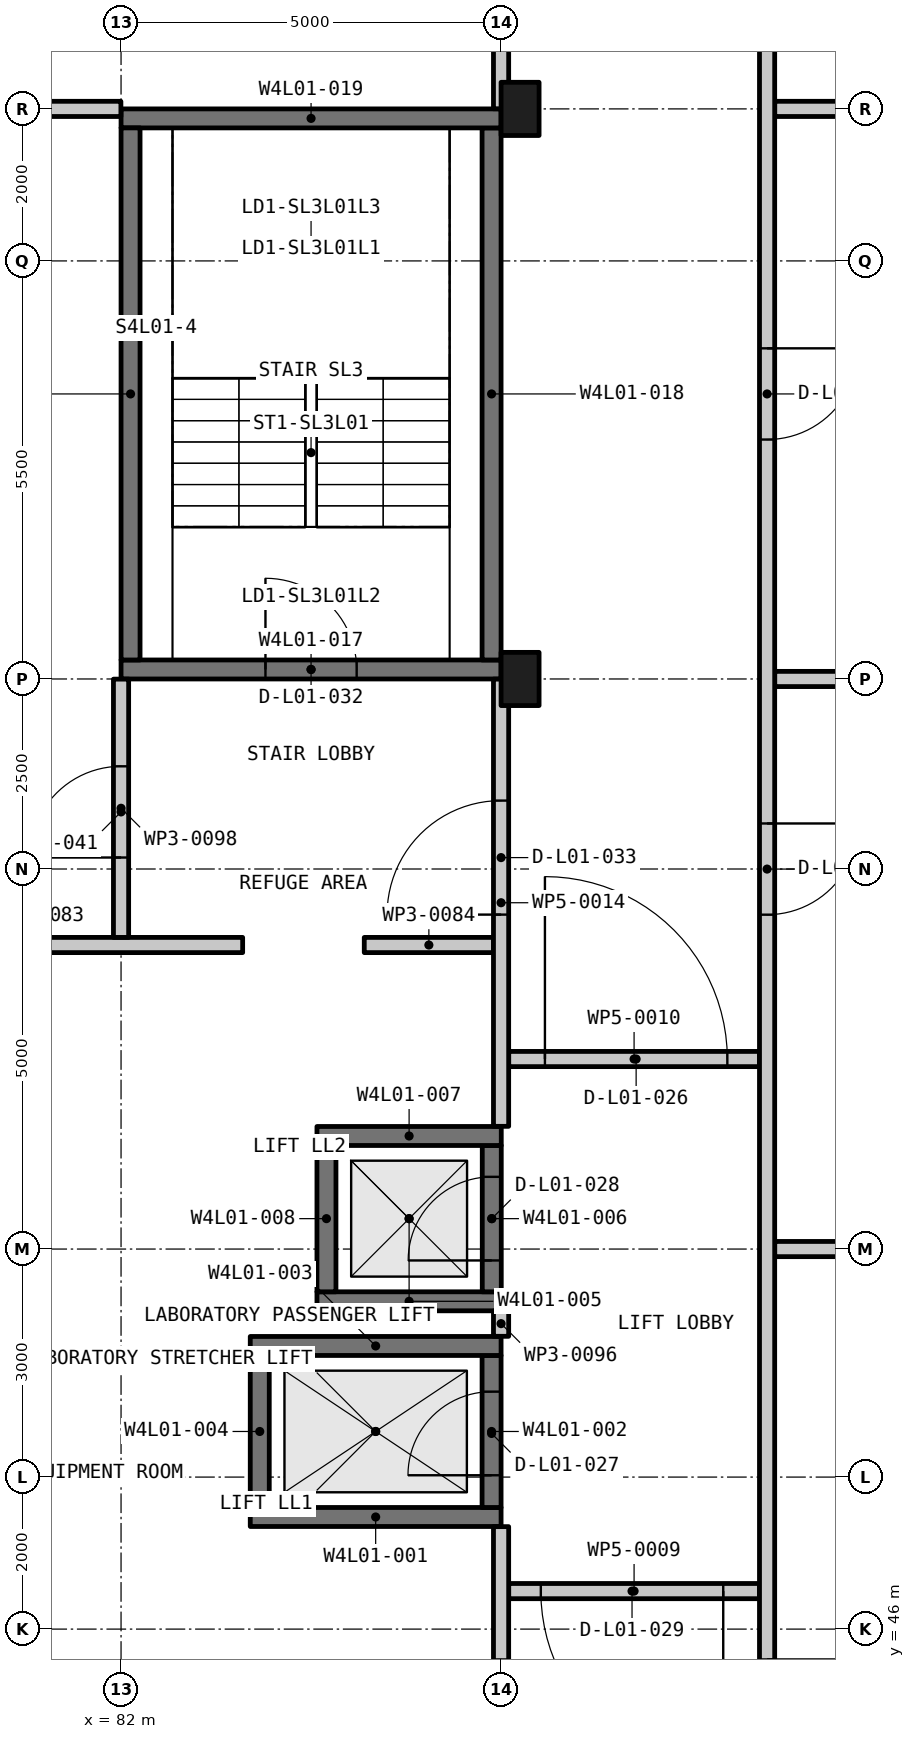
"""IFC4 building model, lengths in metres.
Left out: names, types, materials, properties, quantities, classifications, styles, units other than length and angle.
Written with IfcOpenShell. Run it as: python <this file> out.ifc"""

import sys

from ifc_helpers import new_model, si_unit, direction, frame, frame_2d, origin, origin_2d, place, context, subcontext, project, spatial, rectangle, extrude, element, fill, save


model = new_model("IFC4")
c1 = context("Model", 3, precision=1e-05, world=origin(), true_north=direction((0.0, 1.0)))
c2 = subcontext(c1, "Body", "Model", "MODEL_VIEW")
j1 = project(units=[si_unit("LENGTHUNIT", "METRE"), si_unit("PLANEANGLEUNIT", "RADIAN")], contexts=[c1])
p1 = place(None, origin())
s1 = spatial("IfcSite", under=j1, at=p1, CompositionType="ELEMENT")
p2 = place(p1, origin())
s2 = spatial("IfcBuilding", under=s1, at=p2, CompositionType="ELEMENT")
p3 = place(p2, frame((0.0, 0.0, 6.0)))
s3 = spatial("IfcBuildingStorey", under=s2, at=p3, CompositionType="ELEMENT", Elevation=6.0)
for number, where, z_axis, x_axis in (
    (1, (87.25, 58.5, -0.3), (0.0, 0.0, 1.0), (1.0, 0.0, 0.0)),
    (2, (87.25, 66.0, -0.3), (0.0, 0.0, 1.0), (1.0, 0.0, 0.0)),
):
    element("IfcColumn", number, at=place(p3, frame(where, z_axis=z_axis, x_axis=x_axis)), inside=s3, PredefinedType="COLUMN", context=c2, shape_type="SweptSolid", body=[
        extrude(rectangle(XDim=0.5, YDim=0.7, at=origin_2d()), origin(), (0.0, 0.0, 1.0), 5.25),
    ])
p4 = place(p3, frame((83.7, 47.475, -0.3), z_axis=(0.0, 0.0, 1.0), x_axis=(1.0, 0.0, 0.0)))
e3 = element("IfcWall", 3, at=p4, inside=s3, PredefinedType="SHEAR", context=c2, shape_type="SweptSolid", body=[
    extrude(rectangle(XDim=3.3, YDim=0.25, at=frame_2d((1.65, 0.0))), origin(), (0.0, 0.0, 1.0), 5.25),
])
p5 = place(p3, frame((86.875, 47.6, -0.3), z_axis=(0.0, 0.0, 1.0), x_axis=(0.0, 1.0, 0.0)))
e4 = element("IfcWall", 4, at=p5, inside=s3, PredefinedType="SHEAR", context=c2, shape_type="SweptSolid", body=[
    extrude(rectangle(XDim=2.0, YDim=0.25, at=frame_2d((1.0, 0.0))), origin(), (0.0, 0.0, 1.0), 5.25),
])
p6 = place(p5, frame((0.424, 0.0, 0.3)))
e5 = element("IfcOpeningElement", 5, at=p6, cuts=e4, PredefinedType="OPENING", context=c2, shape_type="SweptSolid", body=[
    extrude(rectangle(XDim=1.1, YDim=2.1, at=frame_2d((0.55, 1.05))), frame((0.0, 0.135, 0.0), z_axis=(0.0, -1.0, 0.0), x_axis=(1.0, 0.0, 0.0)), (0.0, 0.0, 1.0), 0.27),
])
p7 = place(p3, frame((83.7, 49.725, -0.3), z_axis=(0.0, 0.0, 1.0), x_axis=(1.0, 0.0, 0.0)))
e6 = element("IfcWall", 6, at=p7, inside=s3, PredefinedType="SHEAR", context=c2, shape_type="SweptSolid", body=[
    extrude(rectangle(XDim=3.3, YDim=0.25, at=frame_2d((1.65, 0.0))), origin(), (0.0, 0.0, 1.0), 5.25),
])
p8 = place(p3, frame((83.825, 47.6, -0.3), z_axis=(0.0, 0.0, 1.0), x_axis=(0.0, 1.0, 0.0)))
e7 = element("IfcWall", 7, at=p8, inside=s3, PredefinedType="SHEAR", context=c2, shape_type="SweptSolid", body=[
    extrude(rectangle(XDim=2.0, YDim=0.25, at=frame_2d((1.0, 0.0))), origin(), (0.0, 0.0, 1.0), 5.25),
])
p9 = place(p3, frame((84.577, 50.312, -0.3), z_axis=(0.0, 0.0, 1.0), x_axis=(1.0, 0.0, 0.0)))
e8 = element("IfcWall", 8, at=p9, inside=s3, PredefinedType="SHEAR", context=c2, shape_type="SweptSolid", body=[
    extrude(rectangle(XDim=2.425, YDim=0.25, at=frame_2d((1.212, 0.0))), origin(), (0.0, 0.0, 1.0), 5.25),
])
p10 = place(p3, frame((86.877, 50.438, -0.3), z_axis=(0.0, 0.0, 1.0), x_axis=(0.0, 1.0, 0.0)))
e9 = element("IfcWall", 9, at=p10, inside=s3, PredefinedType="SHEAR", context=c2, shape_type="SweptSolid", body=[
    extrude(rectangle(XDim=1.925, YDim=0.25, at=frame_2d((0.962, 0.0))), origin(), (0.0, 0.0, 1.0), 5.25),
])
p11 = place(p10, frame((0.413, 0.0, 0.3)))
e10 = element("IfcOpeningElement", 10, at=p11, cuts=e9, PredefinedType="OPENING", context=c2, shape_type="SweptSolid", body=[
    extrude(rectangle(XDim=1.1, YDim=2.1, at=frame_2d((0.55, 1.05))), frame((0.0, 0.135, 0.0), z_axis=(0.0, -1.0, 0.0), x_axis=(1.0, 0.0, 0.0)), (0.0, 0.0, 1.0), 0.27),
])
p12 = place(p3, frame((84.577, 52.488, -0.3), z_axis=(0.0, 0.0, 1.0), x_axis=(1.0, 0.0, 0.0)))
e11 = element("IfcWall", 11, at=p12, inside=s3, PredefinedType="SHEAR", context=c2, shape_type="SweptSolid", body=[
    extrude(rectangle(XDim=2.425, YDim=0.25, at=frame_2d((1.212, 0.0))), origin(), (0.0, 0.0, 1.0), 5.25),
])
p13 = place(p3, frame((84.702, 50.438, -0.3), z_axis=(0.0, 0.0, 1.0), x_axis=(0.0, 1.0, 0.0)))
e12 = element("IfcWall", 12, at=p13, inside=s3, PredefinedType="SHEAR", context=c2, shape_type="SweptSolid", body=[
    extrude(rectangle(XDim=1.925, YDim=0.25, at=frame_2d((0.962, 0.0))), origin(), (0.0, 0.0, 1.0), 5.25),
])
p14 = place(p3, frame((82.0, 58.625, -0.3), z_axis=(0.0, 0.0, 1.0), x_axis=(1.0, 0.0, 0.0)))
e13 = element("IfcWall", 13, at=p14, inside=s3, PredefinedType="SHEAR", context=c2, shape_type="SweptSolid", body=[
    extrude(rectangle(XDim=5.0, YDim=0.25, at=frame_2d((2.5, 0.0))), origin(), (0.0, 0.0, 1.0), 5.25),
])
p15 = place(p14, frame((1.9, 0.0, 0.3)))
e14 = element("IfcOpeningElement", 14, at=p15, cuts=e13, PredefinedType="OPENING", context=c2, shape_type="SweptSolid", body=[
    extrude(rectangle(XDim=1.2, YDim=2.2, at=frame_2d((0.6, 1.1))), frame((0.0, 0.135, 0.0), z_axis=(0.0, -1.0, 0.0), x_axis=(1.0, 0.0, 0.0)), (0.0, 0.0, 1.0), 0.27),
])
p16 = place(p3, frame((86.875, 58.75, -0.3), z_axis=(0.0, 0.0, 1.0), x_axis=(0.0, 1.0, 0.0)))
e15 = element("IfcWall", 15, at=p16, inside=s3, PredefinedType="SHEAR", context=c2, shape_type="SweptSolid", body=[
    extrude(rectangle(XDim=7.0, YDim=0.25, at=frame_2d((3.5, 0.0))), origin(), (0.0, 0.0, 1.0), 5.25),
])
p17 = place(p3, frame((82.0, 65.875, -0.3), z_axis=(0.0, 0.0, 1.0), x_axis=(1.0, 0.0, 0.0)))
e16 = element("IfcWall", 16, at=p17, inside=s3, PredefinedType="SHEAR", context=c2, shape_type="SweptSolid", body=[
    extrude(rectangle(XDim=5.0, YDim=0.25, at=frame_2d((2.5, 0.0))), origin(), (0.0, 0.0, 1.0), 5.25),
])
p18 = place(p3, frame((82.125, 58.75, -0.3), z_axis=(0.0, 0.0, 1.0), x_axis=(0.0, 1.0, 0.0)))
e17 = element("IfcWall", 17, at=p18, inside=s3, PredefinedType="SHEAR", context=c2, shape_type="SweptSolid", body=[
    extrude(rectangle(XDim=7.0, YDim=0.25, at=frame_2d((3.5, 0.0))), origin(), (0.0, 0.0, 1.0), 5.25),
])
p19 = place(p3, frame((90.4, 46.5, 0.0), z_axis=(0.0, 0.0, 1.0), x_axis=(-1.0, 0.0, 0.0)))
e18 = element("IfcWall", 18, at=p19, inside=s3, PredefinedType="PARTITIONING", context=c2, shape_type="SweptSolid", body=[
    extrude(rectangle(XDim=3.3, YDim=0.2, at=frame_2d((1.65, 0.0))), origin(), (0.0, 0.0, 1.0), 4.15),
])
p20 = place(p19, frame((0.477, 0.0, 0.0)))
e19 = element("IfcOpeningElement", 19, at=p20, cuts=e18, PredefinedType="OPENING", context=c2, shape_type="SweptSolid", body=[
    extrude(rectangle(XDim=2.4, YDim=2.1, at=frame_2d((1.2, 1.05))), frame((0.0, 0.11, 0.0), z_axis=(0.0, -1.0, 0.0), x_axis=(1.0, 0.0, 0.0)), (0.0, 0.0, 1.0), 0.22),
])
p21 = place(p3, frame((90.6, 51.0, 0.0), z_axis=(0.0, 0.0, 1.0), x_axis=(1.0, 0.0, 0.0)))
e20 = element("IfcWall", 20, at=p21, inside=s3, PredefinedType="PARTITIONING", context=c2, shape_type="SweptSolid", body=[
    extrude(rectangle(XDim=13.2, YDim=0.2, at=frame_2d((6.6, 0.0))), origin(), (0.0, 0.0, 1.0), 4.05),
])
p22 = place(p3, frame((87.1, 53.5, 0.0), z_axis=(0.0, 0.0, 1.0), x_axis=(1.0, 0.0, 0.0)))
e21 = element("IfcWall", 21, at=p22, inside=s3, PredefinedType="PARTITIONING", context=c2, shape_type="SweptSolid", body=[
    extrude(rectangle(XDim=3.3, YDim=0.2, at=frame_2d((1.65, 0.0))), origin(), (0.0, 0.0, 1.0), 4.15),
])
p23 = place(p22, frame((0.477, 0.0, 0.0)))
e22 = element("IfcOpeningElement", 22, at=p23, cuts=e21, PredefinedType="OPENING", context=c2, shape_type="SweptSolid", body=[
    extrude(rectangle(XDim=2.4, YDim=2.1, at=frame_2d((1.2, 1.05))), frame((0.0, 0.11, 0.0), z_axis=(0.0, -1.0, 0.0), x_axis=(1.0, 0.0, 0.0)), (0.0, 0.0, 1.0), 0.22),
])
p24 = place(p3, frame((78.2, 55.0, 0.0), z_axis=(0.0, 0.0, 1.0), x_axis=(1.0, 0.0, 0.0)))
e23 = element("IfcWall", 23, at=p24, inside=s3, PredefinedType="PARTITIONING", context=c2, shape_type="SweptSolid", body=[
    extrude(rectangle(XDim=5.4, YDim=0.2, at=frame_2d((2.7, 0.0))), origin(), (0.0, 0.0, 1.0), 4.15),
])
p25 = place(p3, frame((85.2, 55.0, 0.0), z_axis=(0.0, 0.0, 1.0), x_axis=(1.0, 0.0, 0.0)))
e24 = element("IfcWall", 24, at=p25, inside=s3, PredefinedType="PARTITIONING", context=c2, shape_type="SweptSolid", body=[
    extrude(rectangle(XDim=1.7, YDim=0.2, at=frame_2d((0.85, 0.0))), origin(), (0.0, 0.0, 1.0), 4.35),
])
p26 = place(p3, frame((90.6, 58.5, 0.0), z_axis=(0.0, 0.0, 1.0), x_axis=(1.0, 0.0, 0.0)))
e25 = element("IfcWall", 25, at=p26, inside=s3, PredefinedType="PARTITIONING", context=c2, shape_type="SweptSolid", body=[
    extrude(rectangle(XDim=13.2, YDim=0.2, at=frame_2d((6.6, 0.0))), origin(), (0.0, 0.0, 1.0), 4.05),
])
p27 = place(p3, frame((78.2, 66.0, 0.0), z_axis=(0.0, 0.0, 1.0), x_axis=(1.0, 0.0, 0.0)))
e26 = element("IfcWall", 26, at=p27, inside=s3, PredefinedType="PARTITIONING", context=c2, shape_type="SweptSolid", body=[
    extrude(rectangle(XDim=3.798, YDim=0.2, at=frame_2d((1.899, 0.0))), origin(), (0.0, 0.0, 1.0), 4.15),
])
p28 = place(p3, frame((90.6, 66.0, 0.0), z_axis=(0.0, 0.0, 1.0), x_axis=(1.0, 0.0, 0.0)))
e27 = element("IfcWall", 27, at=p28, inside=s3, PredefinedType="PARTITIONING", context=c2, shape_type="SweptSolid", body=[
    extrude(rectangle(XDim=13.2, YDim=0.2, at=frame_2d((6.6, 0.0))), origin(), (0.0, 0.0, 1.0), 4.05),
])
p29 = place(p3, frame((90.5, 80.8, 0.0), z_axis=(0.0, 0.0, 1.0), x_axis=(0.0, -1.0, 0.0)))
e28 = element("IfcWall", 28, at=p29, inside=s3, PredefinedType="PARTITIONING", context=c2, shape_type="SweptSolid", body=[
    extrude(rectangle(XDim=74.6, YDim=0.2, at=frame_2d((37.3, 0.0))), origin(), (0.0, 0.0, 1.0), 4.05),
])
p30 = place(p29, frame((70.35, 0.0, 0.0)))
e29 = element("IfcOpeningElement", 29, at=p30, cuts=e28, PredefinedType="OPENING", context=c2, shape_type="SweptSolid", body=[
    extrude(rectangle(XDim=1.2, YDim=2.1, at=frame_2d((0.6, 1.05))), frame((0.0, 0.11, 0.0), z_axis=(0.0, -1.0, 0.0), x_axis=(1.0, 0.0, 0.0)), (0.0, 0.0, 1.0), 0.22),
])
p31 = place(p29, frame((62.95, 0.0, 0.0)))
e30 = element("IfcOpeningElement", 30, at=p31, cuts=e28, PredefinedType="OPENING", context=c2, shape_type="SweptSolid", body=[
    extrude(rectangle(XDim=1.2, YDim=2.1, at=frame_2d((0.6, 1.05))), frame((0.0, 0.11, 0.0), z_axis=(0.0, -1.0, 0.0), x_axis=(1.0, 0.0, 0.0)), (0.0, 0.0, 1.0), 0.22),
])
p32 = place(p29, frame((55.45, 0.0, 0.0)))
e31 = element("IfcOpeningElement", 31, at=p32, cuts=e28, PredefinedType="OPENING", context=c2, shape_type="SweptSolid", body=[
    extrude(rectangle(XDim=1.2, YDim=2.1, at=frame_2d((0.6, 1.05))), frame((0.0, 0.11, 0.0), z_axis=(0.0, -1.0, 0.0), x_axis=(1.0, 0.0, 0.0)), (0.0, 0.0, 1.0), 0.22),
])
p33 = place(p29, frame((47.95, 0.0, 0.0)))
e32 = element("IfcOpeningElement", 32, at=p33, cuts=e28, PredefinedType="OPENING", context=c2, shape_type="SweptSolid", body=[
    extrude(rectangle(XDim=1.2, YDim=2.1, at=frame_2d((0.6, 1.05))), frame((0.0, 0.11, 0.0), z_axis=(0.0, -1.0, 0.0), x_axis=(1.0, 0.0, 0.0)), (0.0, 0.0, 1.0), 0.22),
])
p34 = place(p29, frame((40.45, 0.0, 0.0)))
e33 = element("IfcOpeningElement", 33, at=p34, cuts=e28, PredefinedType="OPENING", context=c2, shape_type="SweptSolid", body=[
    extrude(rectangle(XDim=1.2, YDim=2.1, at=frame_2d((0.6, 1.05))), frame((0.0, 0.11, 0.0), z_axis=(0.0, -1.0, 0.0), x_axis=(1.0, 0.0, 0.0)), (0.0, 0.0, 1.0), 0.22),
])
p35 = place(p29, frame((35.199, 0.0, 0.0)))
e34 = element("IfcOpeningElement", 34, at=p35, cuts=e28, PredefinedType="OPENING", context=c2, shape_type="SweptSolid", body=[
    extrude(rectangle(XDim=1.2, YDim=2.1, at=frame_2d((0.6, 1.05))), frame((0.0, 0.11, 0.0), z_axis=(0.0, -1.0, 0.0), x_axis=(1.0, 0.0, 0.0)), (0.0, 0.0, 1.0), 0.22),
])
p36 = place(p29, frame((24.201, 0.0, 0.0)))
e35 = element("IfcOpeningElement", 35, at=p36, cuts=e28, PredefinedType="OPENING", context=c2, shape_type="SweptSolid", body=[
    extrude(rectangle(XDim=1.2, YDim=2.1, at=frame_2d((0.6, 1.05))), frame((0.0, 0.11, 0.0), z_axis=(0.0, -1.0, 0.0), x_axis=(1.0, 0.0, 0.0)), (0.0, 0.0, 1.0), 0.22),
])
p37 = place(p29, frame((17.95, 0.0, 0.0)))
e36 = element("IfcOpeningElement", 36, at=p37, cuts=e28, PredefinedType="OPENING", context=c2, shape_type="SweptSolid", body=[
    extrude(rectangle(XDim=1.2, YDim=2.1, at=frame_2d((0.6, 1.05))), frame((0.0, 0.11, 0.0), z_axis=(0.0, -1.0, 0.0), x_axis=(1.0, 0.0, 0.0)), (0.0, 0.0, 1.0), 0.22),
])
p38 = place(p29, frame((6.825, 0.0, 0.0)))
e37 = element("IfcOpeningElement", 37, at=p38, cuts=e28, PredefinedType="OPENING", context=c2, shape_type="SweptSolid", body=[
    extrude(rectangle(XDim=1.2, YDim=2.1, at=frame_2d((0.6, 1.05))), frame((0.0, 0.11, 0.0), z_axis=(0.0, -1.0, 0.0), x_axis=(1.0, 0.0, 0.0)), (0.0, 0.0, 1.0), 0.22),
])
p39 = place(p3, frame((87.0, 43.502, 0.0), z_axis=(0.0, 0.0, 1.0), x_axis=(0.0, 1.0, 0.0)))
e38 = element("IfcWall", 38, at=p39, inside=s3, PredefinedType="PARTITIONING", context=c2, shape_type="SweptSolid", body=[
    extrude(rectangle(XDim=3.846, YDim=0.2, at=frame_2d((1.923, 0.0))), origin(), (0.0, 0.0, 1.0), 4.15),
])
p40 = place(p39, frame((0.899, 0.0, 0.0)))
e39 = element("IfcOpeningElement", 39, at=p40, cuts=e38, PredefinedType="OPENING", context=c2, shape_type="SweptSolid", body=[
    extrude(rectangle(XDim=1.2, YDim=2.1, at=frame_2d((0.6, 1.05))), frame((0.0, 0.11, 0.0), z_axis=(0.0, -1.0, 0.0), x_axis=(1.0, 0.0, 0.0)), (0.0, 0.0, 1.0), 0.22),
])
p41 = place(p3, frame((87.0, 49.852, 0.0), z_axis=(0.0, 0.0, 1.0), x_axis=(0.0, 1.0, 0.0)))
e40 = element("IfcWall", 40, at=p41, inside=s3, PredefinedType="PARTITIONING", context=c2, shape_type="SweptSolid", body=[
    extrude(rectangle(XDim=0.333, YDim=0.2, at=frame_2d((0.167, 0.0))), origin(), (0.0, 0.0, 1.0), 4.15),
])
p42 = place(p3, frame((87.0, 52.615, 0.0), z_axis=(0.0, 0.0, 1.0), x_axis=(0.0, 1.0, 0.0)))
e41 = element("IfcWall", 41, at=p42, inside=s3, PredefinedType="PARTITIONING", context=c2, shape_type="SweptSolid", body=[
    extrude(rectangle(XDim=5.884, YDim=0.2, at=frame_2d((2.942, 0.0))), origin(), (0.0, 0.0, 1.0), 4.15),
])
p43 = place(p42, frame((2.785, 0.0, 0.0)))
e42 = element("IfcOpeningElement", 42, at=p43, cuts=e41, PredefinedType="OPENING", context=c2, shape_type="SweptSolid", body=[
    extrude(rectangle(XDim=1.5, YDim=2.1, at=frame_2d((0.75, 1.05))), frame((0.0, 0.11, 0.0), z_axis=(0.0, -1.0, 0.0), x_axis=(1.0, 0.0, 0.0)), (0.0, 0.0, 1.0), 0.22),
])
p44 = place(p3, frame((87.0, 66.002, 0.0), z_axis=(0.0, 0.0, 1.0), x_axis=(0.0, 1.0, 0.0)))
e43 = element("IfcWall", 43, at=p44, inside=s3, PredefinedType="PARTITIONING", context=c2, shape_type="SweptSolid", body=[
    extrude(rectangle(XDim=7.496, YDim=0.2, at=frame_2d((3.748, 0.0))), origin(), (0.0, 0.0, 1.0), 4.15),
])
p45 = place(p44, frame((4.098, 0.0, 0.0)))
e44 = element("IfcOpeningElement", 44, at=p45, cuts=e43, PredefinedType="OPENING", context=c2, shape_type="SweptSolid", body=[
    extrude(rectangle(XDim=1.5, YDim=2.1, at=frame_2d((0.75, 1.05))), frame((0.0, 0.11, 0.0), z_axis=(0.0, -1.0, 0.0), x_axis=(1.0, 0.0, 0.0)), (0.0, 0.0, 1.0), 0.22),
])
p46 = place(p44, frame((1.548, 0.0, 0.0)))
e45 = element("IfcOpeningElement", 45, at=p46, cuts=e43, PredefinedType="OPENING", context=c2, shape_type="SweptSolid", body=[
    extrude(rectangle(XDim=1.0, YDim=2.1, at=frame_2d((0.5, 1.05))), frame((0.0, 0.11, 0.0), z_axis=(0.0, -1.0, 0.0), x_axis=(1.0, 0.0, 0.0)), (0.0, 0.0, 1.0), 0.22),
])
p47 = place(p3, frame((82.0, 55.1, 0.0), z_axis=(0.0, 0.0, 1.0), x_axis=(0.0, 1.0, 0.0)))
e46 = element("IfcWall", 46, at=p47, inside=s3, PredefinedType="PARTITIONING", context=c2, shape_type="SweptSolid", body=[
    extrude(rectangle(XDim=3.398, YDim=0.2, at=frame_2d((1.699, 0.0))), origin(), (0.0, 0.0, 1.0), 4.15),
])
p48 = place(p47, frame((1.051, 0.0, 0.0)))
e47 = element("IfcOpeningElement", 47, at=p48, cuts=e46, PredefinedType="OPENING", context=c2, shape_type="SweptSolid", body=[
    extrude(rectangle(XDim=1.2, YDim=2.1, at=frame_2d((0.6, 1.05))), frame((0.0, 0.11, 0.0), z_axis=(0.0, -1.0, 0.0), x_axis=(1.0, 0.0, 0.0)), (0.0, 0.0, 1.0), 0.22),
])
p49 = place(p23, origin())
e48 = element("IfcDoor", 48, at=p49, inside=s3, OperationType="DOUBLE_DOOR_SINGLE_SWING", PredefinedType="DOOR", context=c2, shape_type="SweptSolid", body=[
    extrude(rectangle(XDim=2.4, YDim=2.1, at=frame_2d((1.2, 1.05))), frame((0.0, 0.025, 0.0), z_axis=(0.0, -1.0, 0.0), x_axis=(1.0, 0.0, 0.0)), (0.0, 0.0, 1.0), 0.05),
])
fill(e22, e48)
p50 = place(p6, origin())
e49 = element("IfcDoor", 49, at=p50, inside=s3, OperationType="DOUBLE_DOOR_SLIDING", PredefinedType="DOOR", context=c2, shape_type="SweptSolid", body=[
    extrude(rectangle(XDim=1.1, YDim=2.1, at=frame_2d((0.55, 1.05))), frame((0.0, 0.025, 0.0), z_axis=(0.0, -1.0, 0.0), x_axis=(1.0, 0.0, 0.0)), (0.0, 0.0, 1.0), 0.05),
])
fill(e5, e49)
p51 = place(p11, origin())
e50 = element("IfcDoor", 50, at=p51, inside=s3, OperationType="DOUBLE_DOOR_SLIDING", PredefinedType="DOOR", context=c2, shape_type="SweptSolid", body=[
    extrude(rectangle(XDim=1.1, YDim=2.1, at=frame_2d((0.55, 1.05))), frame((0.0, 0.025, 0.0), z_axis=(0.0, -1.0, 0.0), x_axis=(1.0, 0.0, 0.0)), (0.0, 0.0, 1.0), 0.05),
])
fill(e10, e50)
p52 = place(p20, origin())
e51 = element("IfcDoor", 51, at=p52, inside=s3, OperationType="DOUBLE_DOOR_SINGLE_SWING", PredefinedType="DOOR", context=c2, shape_type="SweptSolid", body=[
    extrude(rectangle(XDim=2.4, YDim=2.1, at=frame_2d((1.2, 1.05))), frame((0.0, 0.025, 0.0), z_axis=(0.0, -1.0, 0.0), x_axis=(1.0, 0.0, 0.0)), (0.0, 0.0, 1.0), 0.05),
])
fill(e19, e51)
p53 = place(p15, origin())
e52 = element("IfcDoor", 52, at=p53, inside=s3, OperationType="SINGLE_SWING_LEFT", PredefinedType="DOOR", context=c2, shape_type="SweptSolid", body=[
    extrude(rectangle(XDim=1.2, YDim=2.2, at=frame_2d((0.6, 1.1))), frame((0.0, 0.025, 0.0), z_axis=(0.0, -1.0, 0.0), x_axis=(1.0, 0.0, 0.0)), (0.0, 0.0, 1.0), 0.05),
])
fill(e14, e52)
p54 = place(p43, origin())
e53 = element("IfcDoor", 53, at=p54, inside=s3, OperationType="DOUBLE_DOOR_SINGLE_SWING", PredefinedType="DOOR", context=c2, shape_type="SweptSolid", body=[
    extrude(rectangle(XDim=1.5, YDim=2.1, at=frame_2d((0.75, 1.05))), frame((0.0, 0.025, 0.0), z_axis=(0.0, -1.0, 0.0), x_axis=(1.0, 0.0, 0.0)), (0.0, 0.0, 1.0), 0.05),
])
fill(e42, e53)
p55 = place(p40, origin())
e54 = element("IfcDoor", 54, at=p55, inside=s3, OperationType="SINGLE_SWING_RIGHT", PredefinedType="DOOR", context=c2, shape_type="SweptSolid", body=[
    extrude(rectangle(XDim=1.2, YDim=2.1, at=frame_2d((0.6, 1.05))), frame((0.0, 0.025, 0.0), z_axis=(0.0, -1.0, 0.0), x_axis=(1.0, 0.0, 0.0)), (0.0, 0.0, 1.0), 0.05),
])
fill(e39, e54)
p56 = place(p48, origin())
e55 = element("IfcDoor", 55, at=p56, inside=s3, OperationType="SINGLE_SWING_RIGHT", PredefinedType="DOOR", context=c2, shape_type="SweptSolid", body=[
    extrude(rectangle(XDim=1.2, YDim=2.1, at=frame_2d((0.6, 1.05))), frame((0.0, 0.025, 0.0), z_axis=(0.0, -1.0, 0.0), x_axis=(1.0, 0.0, 0.0)), (0.0, 0.0, 1.0), 0.05),
])
fill(e47, e55)
p57 = place(p35, origin())
e56 = element("IfcDoor", 56, at=p57, inside=s3, OperationType="SINGLE_SWING_RIGHT", PredefinedType="DOOR", context=c2, shape_type="SweptSolid", body=[
    extrude(rectangle(XDim=1.2, YDim=2.1, at=frame_2d((0.6, 1.05))), frame((0.0, 0.025, 0.0), z_axis=(0.0, -1.0, 0.0), x_axis=(1.0, 0.0, 0.0)), (0.0, 0.0, 1.0), 0.05),
])
fill(e34, e56)
p58 = place(p36, origin())
e57 = element("IfcDoor", 57, at=p58, inside=s3, OperationType="SINGLE_SWING_RIGHT", PredefinedType="DOOR", context=c2, shape_type="SweptSolid", body=[
    extrude(rectangle(XDim=1.2, YDim=2.1, at=frame_2d((0.6, 1.05))), frame((0.0, 0.025, 0.0), z_axis=(0.0, -1.0, 0.0), x_axis=(1.0, 0.0, 0.0)), (0.0, 0.0, 1.0), 0.05),
])
fill(e35, e57)
p59 = place(p37, origin())
e58 = element("IfcDoor", 58, at=p59, inside=s3, OperationType="SINGLE_SWING_RIGHT", PredefinedType="DOOR", context=c2, shape_type="SweptSolid", body=[
    extrude(rectangle(XDim=1.2, YDim=2.1, at=frame_2d((0.6, 1.05))), frame((0.0, 0.025, 0.0), z_axis=(0.0, -1.0, 0.0), x_axis=(1.0, 0.0, 0.0)), (0.0, 0.0, 1.0), 0.05),
])
fill(e36, e58)
save(model, sys.argv[1])
